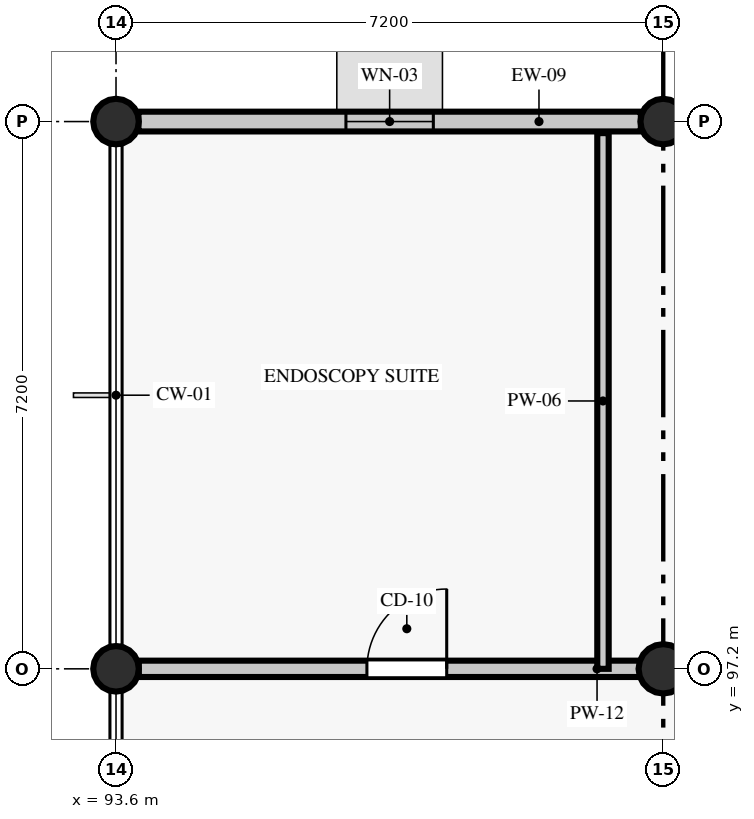
"""IFC4 building model, lengths in metres.
Left out: names, types, materials, properties, quantities, classifications, styles, units other than length and angle.
Written with IfcOpenShell. Run it as: python <this file> out.ifc"""

import sys

from ifc_helpers import new_model, si_unit, direction, frame, frame_2d, origin, origin_2d, place, context, subcontext, project, spatial, rectangle, circle, extrude, element, fill, save


model = new_model("IFC4")
c1 = context("Model", 3, precision=1e-05, world=origin(), true_north=direction((0.0, 1.0)))
c2 = subcontext(c1, "Body", "Model", "MODEL_VIEW")
j1 = project(units=[si_unit("LENGTHUNIT", "METRE"), si_unit("PLANEANGLEUNIT", "RADIAN")], contexts=[c1])
p1 = place(None, origin())
s1 = spatial("IfcSite", under=j1, at=p1, CompositionType="ELEMENT")
p2 = place(p1, origin())
s2 = spatial("IfcBuilding", under=s1, at=p2, CompositionType="ELEMENT")
p3 = place(p2, frame((0.0, 0.0, 9.6)))
s3 = spatial("IfcBuildingStorey", under=s2, at=p3, CompositionType="ELEMENT", Elevation=9.6)
for number, where, z_axis, x_axis in (
    (1, (93.6, 97.2, 0.0), (0.0, 0.0, 1.0), (1.0, 0.0, 0.0)),
    (2, (93.6, 104.4, 0.0), (0.0, 0.0, 1.0), (1.0, 0.0, 0.0)),
):
    element("IfcColumn", number, at=place(p3, frame(where, z_axis=z_axis, x_axis=x_axis)), inside=s3, PredefinedType="COLUMN", context=c2, shape_type="SweptSolid", body=[
        extrude(circle(Radius=0.3, at=origin_2d()), origin(), (0.0, 0.0, 1.0), 3.925),
    ])
p4 = place(p3, frame((100.8, 97.2, 0.0), z_axis=(0.0, 0.0, 1.0), x_axis=(1.0, 0.0, 0.0)))
e3 = element("IfcColumn", 3, at=p4, inside=s3, PredefinedType="COLUMN", context=c2, shape_type="SweptSolid", body=[
    extrude(circle(Radius=0.325, at=origin_2d()), origin(), (0.0, 0.0, 1.0), 3.925),
])
p5 = place(p3, frame((100.8, 104.4, 0.0), z_axis=(0.0, 0.0, 1.0), x_axis=(1.0, 0.0, 0.0)))
e4 = element("IfcColumn", 4, at=p5, inside=s3, PredefinedType="COLUMN", context=c2, shape_type="SweptSolid", body=[
    extrude(circle(Radius=0.3, at=origin_2d()), origin(), (0.0, 0.0, 1.0), 3.925),
])
p6 = place(p3, frame((100.505, 104.4, 0.0), z_axis=(0.0, 0.0, 1.0), x_axis=(-1.0, 0.0, 0.0)))
e5 = element("IfcWall", 5, at=p6, inside=s3, PredefinedType="STANDARD", context=c2, shape_type="SweptSolid", body=[
    extrude(rectangle(XDim=6.61, YDim=0.26, at=frame_2d((3.305, 0.0))), origin(), (0.0, 0.0, 1.0), 3.275),
])
p7 = place(p6, frame((2.73, 0.0, 0.9)))
e6 = element("IfcOpeningElement", 6, at=p7, cuts=e5, PredefinedType="OPENING", context=c2, shape_type="SweptSolid", body=[
    extrude(rectangle(XDim=1.15, YDim=1.3, at=frame_2d((0.575, 0.65))), frame((0.0, 0.14, 0.0), z_axis=(0.0, -1.0, 0.0), x_axis=(1.0, 0.0, 0.0)), (0.0, 0.0, 1.0), 0.28),
])
p8 = place(p3, frame((93.9, 97.2, 0.0), z_axis=(0.0, 0.0, 1.0), x_axis=(1.0, 0.0, 0.0)))
e7 = element("IfcWall", 7, at=p8, inside=s3, PredefinedType="PARTITIONING", context=c2, shape_type="SweptSolid", body=[
    extrude(rectangle(XDim=28.2, YDim=0.215, at=frame_2d((14.1, 0.0))), origin(), (0.0, 0.0, 1.0), 3.175),
])
p9 = place(p8, frame((3.001, 0.0, 0.0)))
e8 = element("IfcOpeningElement", 8, at=p9, cuts=e7, PredefinedType="OPENING", context=c2, shape_type="SweptSolid", body=[
    extrude(rectangle(XDim=1.05, YDim=2.13, at=frame_2d((0.525, 1.065))), frame((0.0, 0.117, 0.0), z_axis=(0.0, -1.0, 0.0), x_axis=(1.0, 0.0, 0.0)), (0.0, 0.0, 1.0), 0.235),
])
p10 = place(p8, frame((8.007, 0.0, 0.0)))
e9 = element("IfcOpeningElement", 9, at=p10, cuts=e7, PredefinedType="OPENING", context=c2, shape_type="SweptSolid", body=[
    extrude(rectangle(XDim=1.1, YDim=2.13, at=frame_2d((0.55, 1.065))), frame((0.0, 0.117, 0.0), z_axis=(0.0, -1.0, 0.0), x_axis=(1.0, 0.0, 0.0)), (0.0, 0.0, 1.0), 0.235),
])
p11 = place(p8, frame((10.04, 0.0, 0.0)))
e10 = element("IfcOpeningElement", 10, at=p11, cuts=e7, PredefinedType="OPENING", context=c2, shape_type="SweptSolid", body=[
    extrude(rectangle(XDim=1.15, YDim=2.13, at=frame_2d((0.575, 1.065))), frame((0.0, 0.117, 0.0), z_axis=(0.0, -1.0, 0.0), x_axis=(1.0, 0.0, 0.0)), (0.0, 0.0, 1.0), 0.235),
])
p12 = place(p8, frame((15.09, 0.0, 0.0)))
e11 = element("IfcOpeningElement", 11, at=p12, cuts=e7, PredefinedType="OPENING", context=c2, shape_type="SweptSolid", body=[
    extrude(rectangle(XDim=0.9, YDim=2.08, at=frame_2d((0.45, 1.04))), frame((0.0, 0.117, 0.0), z_axis=(0.0, -1.0, 0.0), x_axis=(1.0, 0.0, 0.0)), (0.0, 0.0, 1.0), 0.235),
])
p13 = place(p8, frame((17.3, 0.0, 0.0)))
e12 = element("IfcOpeningElement", 12, at=p13, cuts=e7, PredefinedType="OPENING", context=c2, shape_type="SweptSolid", body=[
    extrude(rectangle(XDim=0.9, YDim=2.13, at=frame_2d((0.45, 1.065))), frame((0.0, 0.117, 0.0), z_axis=(0.0, -1.0, 0.0), x_axis=(1.0, 0.0, 0.0)), (0.0, 0.0, 1.0), 0.235),
])
p14 = place(p8, frame((19.56, 0.0, 0.0)))
e13 = element("IfcOpeningElement", 13, at=p14, cuts=e7, PredefinedType="OPENING", context=c2, shape_type="SweptSolid", body=[
    extrude(rectangle(XDim=0.92, YDim=2.18, at=frame_2d((0.46, 1.09))), frame((0.0, 0.117, 0.0), z_axis=(0.0, -1.0, 0.0), x_axis=(1.0, 0.0, 0.0)), (0.0, 0.0, 1.0), 0.235),
])
p15 = place(p8, frame((24.318, 0.0, 0.0)))
e14 = element("IfcOpeningElement", 14, at=p15, cuts=e7, PredefinedType="OPENING", context=c2, shape_type="SweptSolid", body=[
    extrude(rectangle(XDim=1.08, YDim=2.18, at=frame_2d((0.54, 1.09))), frame((0.0, 0.117, 0.0), z_axis=(0.0, -1.0, 0.0), x_axis=(1.0, 0.0, 0.0)), (0.0, 0.0, 1.0), 0.235),
])
p16 = place(p3, frame((100.007, 97.2, 0.0), z_axis=(0.0, 0.0, 1.0), x_axis=(0.0, 1.0, 0.0)))
e15 = element("IfcWall", 15, at=p16, inside=s3, PredefinedType="PARTITIONING", context=c2, shape_type="SweptSolid", body=[
    extrude(rectangle(XDim=7.048, YDim=0.15, at=frame_2d((3.524, 0.0))), origin(), (0.0, 0.0, 1.0), 3.175),
])
p17 = place(p7, origin())
e16 = element("IfcWindow", 16, at=p17, inside=s3, PartitioningType="SINGLE_PANEL", PredefinedType="WINDOW", context=c2, shape_type="SweptSolid", body=[
    extrude(rectangle(XDim=1.15, YDim=1.3, at=frame_2d((0.575, 0.65))), frame((0.0, 0.03, 0.0), z_axis=(0.0, -1.0, 0.0), x_axis=(1.0, 0.0, 0.0)), (0.0, 0.0, 1.0), 0.06),
])
fill(e6, e16)
p18 = place(p9, origin())
e17 = element("IfcDoor", 17, at=p18, inside=s3, OperationType="SINGLE_SWING_RIGHT", PredefinedType="DOOR", context=c2, shape_type="SweptSolid", body=[
    extrude(rectangle(XDim=1.05, YDim=2.13, at=frame_2d((0.525, 1.065))), frame((0.0, 0.025, 0.0), z_axis=(0.0, -1.0, 0.0), x_axis=(1.0, 0.0, 0.0)), (0.0, 0.0, 1.0), 0.05),
])
fill(e8, e17)
save(model, sys.argv[1])
